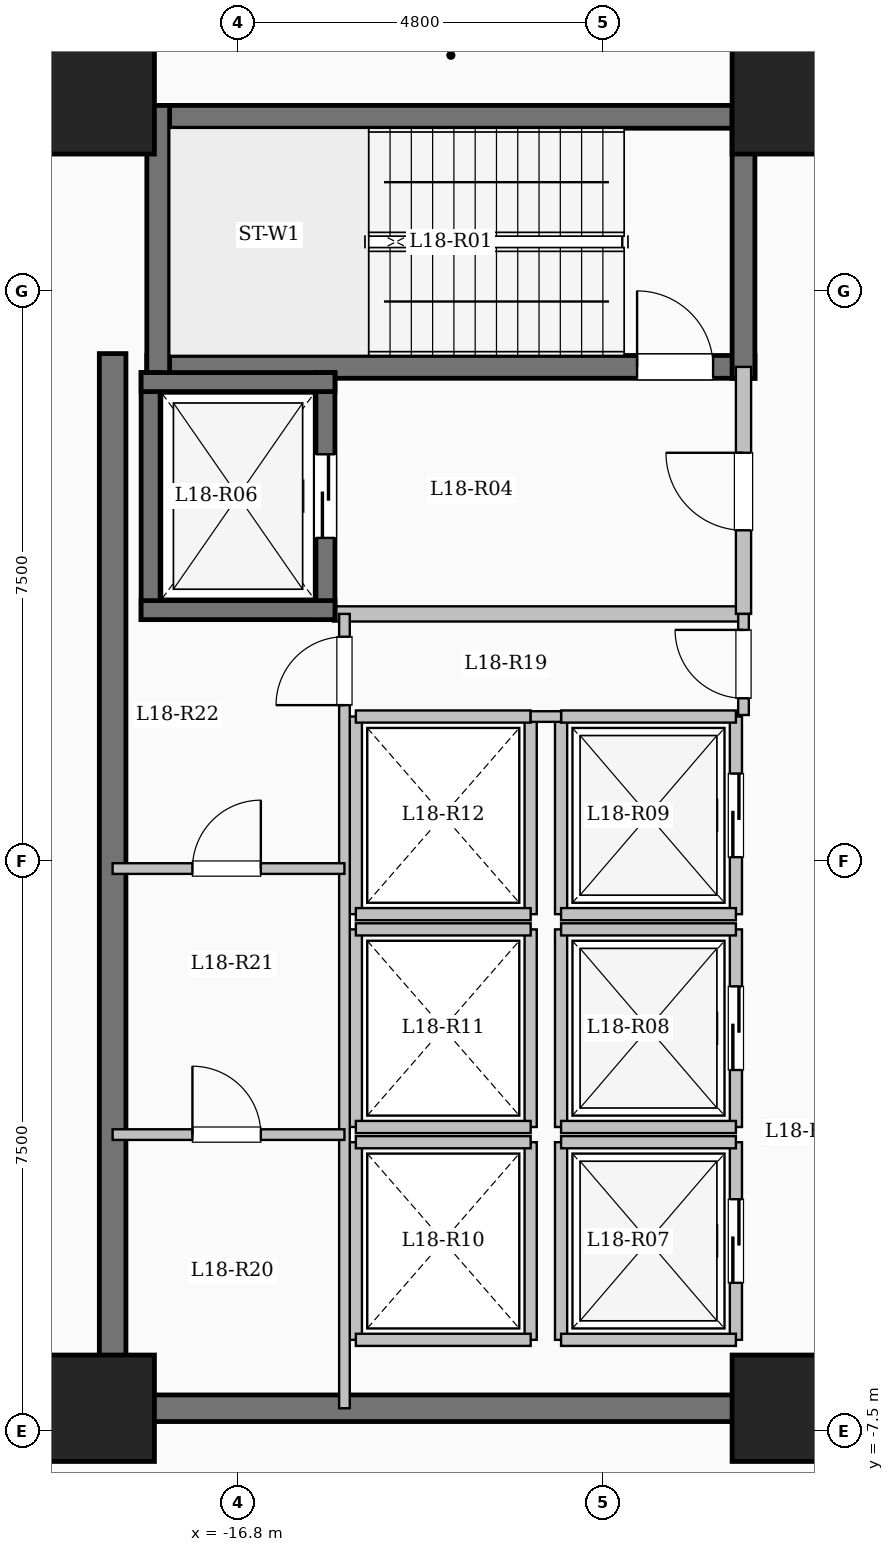
"""IFC4 building model, lengths in metres.
Left out: names, types, materials, properties, quantities, classifications, styles, units other than length and angle.
Written with IfcOpenShell. Run it as: python <this file> out.ifc"""

import sys

from ifc_helpers import new_model, si_unit, direction, frame, frame_2d, origin, origin_2d, place, context, subcontext, project, spatial, rectangle, extrude, element, fill, save


model = new_model("IFC4")
c1 = context("Model", 3, precision=1e-05, world=origin(), true_north=direction((0.0, 1.0)))
c2 = subcontext(c1, "Body", "Model", "MODEL_VIEW")
j1 = project(units=[si_unit("LENGTHUNIT", "METRE"), si_unit("PLANEANGLEUNIT", "RADIAN")], contexts=[c1])
p1 = place(None, origin())
s1 = spatial("IfcSite", under=j1, at=p1, CompositionType="ELEMENT")
p2 = place(p1, origin())
s2 = spatial("IfcBuilding", under=s1, at=p2, CompositionType="ELEMENT")
p3 = place(p2, frame((0.0, 0.0, 68.7)))
s3 = spatial("IfcBuildingStorey", under=s2, at=p3, CompositionType="ELEMENT", Elevation=68.7)
for number, where, z_axis, x_axis in (
    (1, (-9.6, -7.2, 0.0), (0.0, 0.0, 1.0), (1.0, 0.0, 0.0)),
    (2, (-9.6, 10.0, 0.0), (0.0, 0.0, 1.0), (1.0, 0.0, 0.0)),
    (3, (-18.6, -7.2, 0.0), (0.0, 0.0, 1.0), (1.0, 0.0, 0.0)),
    (4, (-18.6, 10.0, 0.0), (0.0, 0.0, 1.0), (1.0, 0.0, 0.0)),
):
    element("IfcColumn", number, at=place(p3, frame(where, z_axis=z_axis, x_axis=x_axis)), inside=s3, PredefinedType="COLUMN", context=c2, shape_type="SweptSolid", body=[
        extrude(rectangle(XDim=1.4, YDim=1.4, at=origin_2d()), origin(), (0.0, 0.0, 1.0), 4.5),
    ])
p4 = place(p3, frame((-18.0, 9.79, 0.0), z_axis=(0.0, 0.0, 1.0), x_axis=(1.0, 0.0, 0.0)))
e5 = element("IfcWall", 5, at=p4, inside=s3, PredefinedType="SHEAR", context=c2, shape_type="SweptSolid", body=[
    extrude(rectangle(XDim=8.0, YDim=0.3, at=frame_2d((4.0, 0.0))), origin(), (0.0, 0.0, 1.0), 4.5),
])
p5 = place(p3, frame((-18.0, 6.5, 0.0), z_axis=(0.0, 0.0, 1.0), x_axis=(1.0, 0.0, 0.0)))
e6 = element("IfcWall", 6, at=p5, inside=s3, PredefinedType="SHEAR", context=c2, shape_type="SweptSolid", body=[
    extrude(rectangle(XDim=8.0, YDim=0.3, at=frame_2d((4.0, 0.0))), origin(), (0.0, 0.0, 1.0), 4.5),
])
p6 = place(p5, frame((6.45, 0.0, 0.0)))
e7 = element("IfcOpeningElement", 7, at=p6, cuts=e6, PredefinedType="OPENING", context=c2, shape_type="SweptSolid", body=[
    extrude(rectangle(XDim=1.0, YDim=2.15, at=frame_2d((0.5, 1.075))), frame((0.0, 0.16, 0.0), z_axis=(0.0, -1.0, 0.0), x_axis=(1.0, 0.0, 0.0)), (0.0, 0.0, 1.0), 0.32),
])
for number, where, z_axis, x_axis in (
    (8, (-17.85, 6.35, 0.0), (0.0, 0.0, 1.0), (0.0, 1.0, 0.0)),
    (9, (-10.15, 6.35, 0.0), (0.0, 0.0, 1.0), (0.0, 1.0, 0.0)),
):
    element("IfcWall", number, at=place(p3, frame(where, z_axis=z_axis, x_axis=x_axis)), inside=s3, PredefinedType="SHEAR", context=c2, shape_type="SweptSolid", body=[
        extrude(rectangle(XDim=3.59, YDim=0.3, at=frame_2d((1.795, 0.0))), origin(), (0.0, 0.0, 1.0), 4.5),
    ])
p7 = place(p3, frame((-15.55, 3.25, 0.0), z_axis=(0.0, 0.0, 1.0), x_axis=(1.0, 0.0, 0.0)))
e10 = element("IfcWall", 10, at=p7, inside=s3, PredefinedType="SOLIDWALL", context=c2, shape_type="SweptSolid", body=[
    extrude(rectangle(XDim=5.4, YDim=0.2, at=frame_2d((2.7, 0.0))), origin(), (0.0, 0.0, 1.0), 4.2),
])
p8 = place(p3, frame((-10.15, 3.25, 0.0), z_axis=(0.0, 0.0, 1.0), x_axis=(0.0, 1.0, 0.0)))
e11 = element("IfcWall", 11, at=p8, inside=s3, PredefinedType="SOLIDWALL", context=c2, shape_type="SweptSolid", body=[
    extrude(rectangle(XDim=3.25, YDim=0.2, at=frame_2d((1.625, 0.0))), origin(), (0.0, 0.0, 1.0), 4.2),
])
p9 = place(p8, frame((1.1, 0.0, 0.0)))
e12 = element("IfcOpeningElement", 12, at=p9, cuts=e11, PredefinedType="OPENING", context=c2, shape_type="SweptSolid", body=[
    extrude(rectangle(XDim=1.02, YDim=2.15, at=frame_2d((0.51, 1.075))), frame((0.0, 0.11, 0.0), z_axis=(0.0, -1.0, 0.0), x_axis=(1.0, 0.0, 0.0)), (0.0, 0.0, 1.0), 0.22),
])
p10 = place(p3, frame((-17.95, 3.175, 0.0), z_axis=(0.0, 0.0, 1.0), x_axis=(0.0, 1.0, 0.0)))
e13 = element("IfcWall", 13, at=p10, inside=s3, PredefinedType="SHEAR", context=c2, shape_type="SweptSolid", body=[
    extrude(rectangle(XDim=3.25, YDim=0.25, at=frame_2d((1.625, 0.0))), origin(), (0.0, 0.0, 1.0), 4.5),
])
p11 = place(p3, frame((-15.65, 3.175, 0.0), z_axis=(0.0, 0.0, 1.0), x_axis=(0.0, 1.0, 0.0)))
e14 = element("IfcWall", 14, at=p11, inside=s3, PredefinedType="SHEAR", context=c2, shape_type="SweptSolid", body=[
    extrude(rectangle(XDim=3.25, YDim=0.25, at=frame_2d((1.625, 0.0))), origin(), (0.0, 0.0, 1.0), 4.5),
])
p12 = place(p11, frame((1.075, 0.0, 0.0)))
e15 = element("IfcOpeningElement", 15, at=p12, cuts=e14, PredefinedType="OPENING", context=c2, shape_type="SweptSolid", body=[
    extrude(rectangle(XDim=1.1, YDim=2.15, at=frame_2d((0.55, 1.075))), frame((0.0, 0.135, 0.0), z_axis=(0.0, -1.0, 0.0), x_axis=(1.0, 0.0, 0.0)), (0.0, 0.0, 1.0), 0.27),
])
for number, where, z_axis, x_axis in (
    (16, (-18.075, 3.3, 0.0), (0.0, 0.0, 1.0), (1.0, 0.0, 0.0)),
    (17, (-18.075, 6.3, 0.0), (0.0, 0.0, 1.0), (1.0, 0.0, 0.0)),
):
    element("IfcWall", number, at=place(p3, frame(where, z_axis=z_axis, x_axis=x_axis)), inside=s3, PredefinedType="SHEAR", context=c2, shape_type="SweptSolid", body=[
        extrude(rectangle(XDim=2.55, YDim=0.25, at=frame_2d((1.275, 0.0))), origin(), (0.0, 0.0, 1.0), 4.5),
    ])
p13 = place(p3, frame((-12.55, -6.3, 0.0), z_axis=(0.0, 0.0, 1.0), x_axis=(0.0, 1.0, 0.0)))
e18 = element("IfcWall", 18, at=p13, inside=s3, PredefinedType="SOLIDWALL", context=c2, shape_type="SweptSolid", body=[
    extrude(rectangle(XDim=2.6, YDim=0.16, at=frame_2d((1.3, 0.0))), origin(), (0.0, 0.0, 1.0), 4.2),
])
p14 = place(p3, frame((-10.25, -6.3, 0.0), z_axis=(0.0, 0.0, 1.0), x_axis=(0.0, 1.0, 0.0)))
e19 = element("IfcWall", 19, at=p14, inside=s3, PredefinedType="SOLIDWALL", context=c2, shape_type="SweptSolid", body=[
    extrude(rectangle(XDim=2.6, YDim=0.16, at=frame_2d((1.3, 0.0))), origin(), (0.0, 0.0, 1.0), 4.2),
])
p15 = place(p14, frame((0.75, 0.0, 0.0)))
e20 = element("IfcOpeningElement", 20, at=p15, cuts=e19, PredefinedType="OPENING", context=c2, shape_type="SweptSolid", body=[
    extrude(rectangle(XDim=1.1, YDim=2.15, at=frame_2d((0.55, 1.075))), frame((0.0, 0.09, 0.0), z_axis=(0.0, -1.0, 0.0), x_axis=(1.0, 0.0, 0.0)), (0.0, 0.0, 1.0), 0.18),
])
for number, where, z_axis, x_axis in (
    (21, (-12.55, -6.3, 0.0), (0.0, 0.0, 1.0), (1.0, 0.0, 0.0)),
    (22, (-12.55, -3.7, 0.0), (0.0, 0.0, 1.0), (1.0, 0.0, 0.0)),
):
    element("IfcWall", number, at=place(p3, frame(where, z_axis=z_axis, x_axis=x_axis)), inside=s3, PredefinedType="SOLIDWALL", context=c2, shape_type="SweptSolid", body=[
        extrude(rectangle(XDim=2.3, YDim=0.16, at=frame_2d((1.15, 0.0))), origin(), (0.0, 0.0, 1.0), 4.2),
    ])
p16 = place(p3, frame((-12.55, -3.5, 0.0), z_axis=(0.0, 0.0, 1.0), x_axis=(0.0, 1.0, 0.0)))
e23 = element("IfcWall", 23, at=p16, inside=s3, PredefinedType="SOLIDWALL", context=c2, shape_type="SweptSolid", body=[
    extrude(rectangle(XDim=2.6, YDim=0.16, at=frame_2d((1.3, 0.0))), origin(), (0.0, 0.0, 1.0), 4.2),
])
p17 = place(p3, frame((-10.25, -3.5, 0.0), z_axis=(0.0, 0.0, 1.0), x_axis=(0.0, 1.0, 0.0)))
e24 = element("IfcWall", 24, at=p17, inside=s3, PredefinedType="SOLIDWALL", context=c2, shape_type="SweptSolid", body=[
    extrude(rectangle(XDim=2.6, YDim=0.16, at=frame_2d((1.3, 0.0))), origin(), (0.0, 0.0, 1.0), 4.2),
])
p18 = place(p17, frame((0.75, 0.0, 0.0)))
e25 = element("IfcOpeningElement", 25, at=p18, cuts=e24, PredefinedType="OPENING", context=c2, shape_type="SweptSolid", body=[
    extrude(rectangle(XDim=1.1, YDim=2.15, at=frame_2d((0.55, 1.075))), frame((0.0, 0.09, 0.0), z_axis=(0.0, -1.0, 0.0), x_axis=(1.0, 0.0, 0.0)), (0.0, 0.0, 1.0), 0.18),
])
for number, where, z_axis, x_axis in (
    (26, (-12.55, -3.5, 0.0), (0.0, 0.0, 1.0), (1.0, 0.0, 0.0)),
    (27, (-12.55, -0.9, 0.0), (0.0, 0.0, 1.0), (1.0, 0.0, 0.0)),
):
    element("IfcWall", number, at=place(p3, frame(where, z_axis=z_axis, x_axis=x_axis)), inside=s3, PredefinedType="SOLIDWALL", context=c2, shape_type="SweptSolid", body=[
        extrude(rectangle(XDim=2.3, YDim=0.16, at=frame_2d((1.15, 0.0))), origin(), (0.0, 0.0, 1.0), 4.2),
    ])
p19 = place(p3, frame((-12.55, -0.7, 0.0), z_axis=(0.0, 0.0, 1.0), x_axis=(0.0, 1.0, 0.0)))
e28 = element("IfcWall", 28, at=p19, inside=s3, PredefinedType="SOLIDWALL", context=c2, shape_type="SweptSolid", body=[
    extrude(rectangle(XDim=2.6, YDim=0.16, at=frame_2d((1.3, 0.0))), origin(), (0.0, 0.0, 1.0), 4.2),
])
p20 = place(p3, frame((-10.25, -0.7, 0.0), z_axis=(0.0, 0.0, 1.0), x_axis=(0.0, 1.0, 0.0)))
e29 = element("IfcWall", 29, at=p20, inside=s3, PredefinedType="SOLIDWALL", context=c2, shape_type="SweptSolid", body=[
    extrude(rectangle(XDim=2.6, YDim=0.16, at=frame_2d((1.3, 0.0))), origin(), (0.0, 0.0, 1.0), 4.2),
])
p21 = place(p20, frame((0.75, 0.0, 0.0)))
e30 = element("IfcOpeningElement", 30, at=p21, cuts=e29, PredefinedType="OPENING", context=c2, shape_type="SweptSolid", body=[
    extrude(rectangle(XDim=1.1, YDim=2.15, at=frame_2d((0.55, 1.075))), frame((0.0, 0.09, 0.0), z_axis=(0.0, -1.0, 0.0), x_axis=(1.0, 0.0, 0.0)), (0.0, 0.0, 1.0), 0.18),
])
for number, where, z_axis, x_axis in (
    (31, (-12.55, -0.7, 0.0), (0.0, 0.0, 1.0), (1.0, 0.0, 0.0)),
    (32, (-12.55, 1.9, 0.0), (0.0, 0.0, 1.0), (1.0, 0.0, 0.0)),
):
    element("IfcWall", number, at=place(p3, frame(where, z_axis=z_axis, x_axis=x_axis)), inside=s3, PredefinedType="SOLIDWALL", context=c2, shape_type="SweptSolid", body=[
        extrude(rectangle(XDim=2.3, YDim=0.16, at=frame_2d((1.15, 0.0))), origin(), (0.0, 0.0, 1.0), 4.2),
    ])
for number, where, z_axis, x_axis in (
    (33, (-15.25, -6.3, 0.0), (0.0, 0.0, 1.0), (0.0, 1.0, 0.0)),
    (34, (-12.95, -6.3, 0.0), (0.0, 0.0, 1.0), (0.0, 1.0, 0.0)),
):
    element("IfcWall", number, at=place(p3, frame(where, z_axis=z_axis, x_axis=x_axis)), inside=s3, PredefinedType="SOLIDWALL", context=c2, shape_type="SweptSolid", body=[
        extrude(rectangle(XDim=2.6, YDim=0.16, at=frame_2d((1.3, 0.0))), origin(), (0.0, 0.0, 1.0), 4.2),
    ])
for number, where, z_axis, x_axis in (
    (35, (-15.25, -6.3, 0.0), (0.0, 0.0, 1.0), (1.0, 0.0, 0.0)),
    (36, (-15.25, -3.7, 0.0), (0.0, 0.0, 1.0), (1.0, 0.0, 0.0)),
):
    element("IfcWall", number, at=place(p3, frame(where, z_axis=z_axis, x_axis=x_axis)), inside=s3, PredefinedType="SOLIDWALL", context=c2, shape_type="SweptSolid", body=[
        extrude(rectangle(XDim=2.3, YDim=0.16, at=frame_2d((1.15, 0.0))), origin(), (0.0, 0.0, 1.0), 4.2),
    ])
for number, where, z_axis, x_axis in (
    (37, (-15.25, -3.5, 0.0), (0.0, 0.0, 1.0), (0.0, 1.0, 0.0)),
    (38, (-12.95, -3.5, 0.0), (0.0, 0.0, 1.0), (0.0, 1.0, 0.0)),
):
    element("IfcWall", number, at=place(p3, frame(where, z_axis=z_axis, x_axis=x_axis)), inside=s3, PredefinedType="SOLIDWALL", context=c2, shape_type="SweptSolid", body=[
        extrude(rectangle(XDim=2.6, YDim=0.16, at=frame_2d((1.3, 0.0))), origin(), (0.0, 0.0, 1.0), 4.2),
    ])
for number, where, z_axis, x_axis in (
    (39, (-15.25, -3.5, 0.0), (0.0, 0.0, 1.0), (1.0, 0.0, 0.0)),
    (40, (-15.25, -0.9, 0.0), (0.0, 0.0, 1.0), (1.0, 0.0, 0.0)),
):
    element("IfcWall", number, at=place(p3, frame(where, z_axis=z_axis, x_axis=x_axis)), inside=s3, PredefinedType="SOLIDWALL", context=c2, shape_type="SweptSolid", body=[
        extrude(rectangle(XDim=2.3, YDim=0.16, at=frame_2d((1.15, 0.0))), origin(), (0.0, 0.0, 1.0), 4.2),
    ])
for number, where, z_axis, x_axis in (
    (41, (-15.25, -0.7, 0.0), (0.0, 0.0, 1.0), (0.0, 1.0, 0.0)),
    (42, (-12.95, -0.7, 0.0), (0.0, 0.0, 1.0), (0.0, 1.0, 0.0)),
):
    element("IfcWall", number, at=place(p3, frame(where, z_axis=z_axis, x_axis=x_axis)), inside=s3, PredefinedType="SOLIDWALL", context=c2, shape_type="SweptSolid", body=[
        extrude(rectangle(XDim=2.6, YDim=0.16, at=frame_2d((1.3, 0.0))), origin(), (0.0, 0.0, 1.0), 4.2),
    ])
for number, where, z_axis, x_axis in (
    (43, (-15.25, -0.7, 0.0), (0.0, 0.0, 1.0), (1.0, 0.0, 0.0)),
    (44, (-15.25, 1.9, 0.0), (0.0, 0.0, 1.0), (1.0, 0.0, 0.0)),
):
    element("IfcWall", number, at=place(p3, frame(where, z_axis=z_axis, x_axis=x_axis)), inside=s3, PredefinedType="SOLIDWALL", context=c2, shape_type="SweptSolid", body=[
        extrude(rectangle(XDim=2.3, YDim=0.16, at=frame_2d((1.15, 0.0))), origin(), (0.0, 0.0, 1.0), 4.2),
    ])
p22 = place(p3, frame((-18.45, -7.375, 0.0), z_axis=(0.0, 0.0, 1.0), x_axis=(0.0, 1.0, 0.0)))
e45 = element("IfcWall", 45, at=p22, inside=s3, PredefinedType="SHEAR", context=c2, shape_type="SweptSolid", body=[
    extrude(rectangle(XDim=14.05, YDim=0.35, at=frame_2d((7.025, 0.0))), origin(), (0.0, 0.0, 1.0), 4.5),
])
p23 = place(p3, frame((-18.625, -7.2, 0.0), z_axis=(0.0, 0.0, 1.0), x_axis=(1.0, 0.0, 0.0)))
e46 = element("IfcWall", 46, at=p23, inside=s3, PredefinedType="SHEAR", context=c2, shape_type="SweptSolid", body=[
    extrude(rectangle(XDim=8.55, YDim=0.35, at=frame_2d((4.275, 0.0))), origin(), (0.0, 0.0, 1.0), 4.5),
])
p24 = place(p3, frame((-12.95, 1.9, 0.0), z_axis=(0.0, 0.0, 1.0), x_axis=(1.0, 0.0, 0.0)))
e47 = element("IfcWall", 47, at=p24, inside=s3, PredefinedType="PARTITIONING", context=c2, shape_type="SweptSolid", body=[
    extrude(rectangle(XDim=0.4, YDim=0.14, at=frame_2d((0.2, 0.0))), origin(), (0.0, 0.0, 1.0), 4.2),
])
p25 = place(p3, frame((-10.15, 1.92, 0.0), z_axis=(0.0, 0.0, 1.0), x_axis=(0.0, 1.0, 0.0)))
e48 = element("IfcWall", 48, at=p25, inside=s3, PredefinedType="PARTITIONING", context=c2, shape_type="SweptSolid", body=[
    extrude(rectangle(XDim=1.33, YDim=0.14, at=frame_2d((0.665, 0.0))), origin(), (0.0, 0.0, 1.0), 4.2),
])
p26 = place(p25, frame((0.22, 0.0, 0.0)))
e49 = element("IfcOpeningElement", 49, at=p26, cuts=e48, PredefinedType="OPENING", context=c2, shape_type="SweptSolid", body=[
    extrude(rectangle(XDim=0.9, YDim=2.08, at=frame_2d((0.45, 1.04))), frame((0.0, 0.08, 0.0), z_axis=(0.0, -1.0, 0.0), x_axis=(1.0, 0.0, 0.0)), (0.0, 0.0, 1.0), 0.16),
])
p27 = place(p3, frame((-15.4, -7.2, 0.0), z_axis=(0.0, 0.0, 1.0), x_axis=(0.0, 1.0, 0.0)))
e50 = element("IfcWall", 50, at=p27, inside=s3, PredefinedType="PARTITIONING", context=c2, shape_type="SweptSolid", body=[
    extrude(rectangle(XDim=10.45, YDim=0.14, at=frame_2d((5.225, 0.0))), origin(), (0.0, 0.0, 1.0), 4.2),
])
p28 = place(p27, frame((9.25, 0.0, 0.0)))
e51 = element("IfcOpeningElement", 51, at=p28, cuts=e50, PredefinedType="OPENING", context=c2, shape_type="SweptSolid", body=[
    extrude(rectangle(XDim=0.9, YDim=2.08, at=frame_2d((0.45, 1.04))), frame((0.0, 0.08, 0.0), z_axis=(0.0, -1.0, 0.0), x_axis=(1.0, 0.0, 0.0)), (0.0, 0.0, 1.0), 0.16),
])
p29 = place(p3, frame((-18.45, -3.6, 0.0), z_axis=(0.0, 0.0, 1.0), x_axis=(1.0, 0.0, 0.0)))
e52 = element("IfcWall", 52, at=p29, inside=s3, PredefinedType="PARTITIONING", context=c2, shape_type="SweptSolid", body=[
    extrude(rectangle(XDim=3.05, YDim=0.14, at=frame_2d((1.525, 0.0))), origin(), (0.0, 0.0, 1.0), 4.2),
])
p30 = place(p29, frame((1.05, 0.0, 0.0)))
e53 = element("IfcOpeningElement", 53, at=p30, cuts=e52, PredefinedType="OPENING", context=c2, shape_type="SweptSolid", body=[
    extrude(rectangle(XDim=0.9, YDim=2.08, at=frame_2d((0.45, 1.04))), frame((0.0, 0.08, 0.0), z_axis=(0.0, -1.0, 0.0), x_axis=(1.0, 0.0, 0.0)), (0.0, 0.0, 1.0), 0.16),
])
p31 = place(p3, frame((-18.45, -0.1, 0.0), z_axis=(0.0, 0.0, 1.0), x_axis=(1.0, 0.0, 0.0)))
e54 = element("IfcWall", 54, at=p31, inside=s3, PredefinedType="PARTITIONING", context=c2, shape_type="SweptSolid", body=[
    extrude(rectangle(XDim=3.05, YDim=0.14, at=frame_2d((1.525, 0.0))), origin(), (0.0, 0.0, 1.0), 4.2),
])
p32 = place(p31, frame((1.05, 0.0, 0.0)))
e55 = element("IfcOpeningElement", 55, at=p32, cuts=e54, PredefinedType="OPENING", context=c2, shape_type="SweptSolid", body=[
    extrude(rectangle(XDim=0.9, YDim=2.08, at=frame_2d((0.45, 1.04))), frame((0.0, 0.08, 0.0), z_axis=(0.0, -1.0, 0.0), x_axis=(1.0, 0.0, 0.0)), (0.0, 0.0, 1.0), 0.16),
])
p33 = place(p3, frame((-28.68, -7.25, 0.0), z_axis=(0.0, 0.0, 1.0), x_axis=(1.0, 0.0, 0.0)))
e56 = element("IfcWall", 56, at=p33, inside=s3, PredefinedType="PARTITIONING", context=c2, shape_type="SweptSolid", body=[
    extrude(rectangle(XDim=10.23, YDim=0.15, at=frame_2d((5.115, 0.0))), origin(), (0.0, 0.0, 1.0), 4.2),
])
p34 = place(p33, frame((7.03, 0.0, 0.0)))
e57 = element("IfcOpeningElement", 57, at=p34, cuts=e56, PredefinedType="OPENING", context=c2, shape_type="SweptSolid", body=[
    extrude(rectangle(XDim=1.08, YDim=2.15, at=frame_2d((0.54, 1.075))), frame((0.0, 0.085, 0.0), z_axis=(0.0, -1.0, 0.0), x_axis=(1.0, 0.0, 0.0)), (0.0, 0.0, 1.0), 0.17),
])
p35 = place(p6, origin())
e58 = element("IfcDoor", 58, at=p35, inside=s3, OperationType="SINGLE_SWING_LEFT", PredefinedType="DOOR", context=c2, shape_type="SweptSolid", body=[
    extrude(rectangle(XDim=1.0, YDim=2.15, at=frame_2d((0.5, 1.075))), frame((0.0, 0.025, 0.0), z_axis=(0.0, -1.0, 0.0), x_axis=(1.0, 0.0, 0.0)), (0.0, 0.0, 1.0), 0.05),
])
fill(e7, e58)
p36 = place(p9, origin())
e59 = element("IfcDoor", 59, at=p36, inside=s3, OperationType="SINGLE_SWING_RIGHT", PredefinedType="DOOR", context=c2, shape_type="SweptSolid", body=[
    extrude(rectangle(XDim=1.02, YDim=2.15, at=frame_2d((0.51, 1.075))), frame((0.0, 0.025, 0.0), z_axis=(0.0, -1.0, 0.0), x_axis=(1.0, 0.0, 0.0)), (0.0, 0.0, 1.0), 0.05),
])
fill(e12, e59)
p37 = place(p12, origin())
e60 = element("IfcDoor", 60, at=p37, inside=s3, OperationType="SLIDING_TO_LEFT", PredefinedType="DOOR", context=c2, shape_type="SweptSolid", body=[
    extrude(rectangle(XDim=1.1, YDim=2.15, at=frame_2d((0.55, 1.075))), frame((0.0, 0.025, 0.0), z_axis=(0.0, -1.0, 0.0), x_axis=(1.0, 0.0, 0.0)), (0.0, 0.0, 1.0), 0.05),
])
fill(e15, e60)
p38 = place(p15, origin())
e61 = element("IfcDoor", 61, at=p38, inside=s3, OperationType="SLIDING_TO_LEFT", PredefinedType="DOOR", context=c2, shape_type="SweptSolid", body=[
    extrude(rectangle(XDim=1.1, YDim=2.15, at=frame_2d((0.55, 1.075))), frame((0.0, 0.025, 0.0), z_axis=(0.0, -1.0, 0.0), x_axis=(1.0, 0.0, 0.0)), (0.0, 0.0, 1.0), 0.05),
])
fill(e20, e61)
p39 = place(p18, origin())
e62 = element("IfcDoor", 62, at=p39, inside=s3, OperationType="SLIDING_TO_LEFT", PredefinedType="DOOR", context=c2, shape_type="SweptSolid", body=[
    extrude(rectangle(XDim=1.1, YDim=2.15, at=frame_2d((0.55, 1.075))), frame((0.0, 0.025, 0.0), z_axis=(0.0, -1.0, 0.0), x_axis=(1.0, 0.0, 0.0)), (0.0, 0.0, 1.0), 0.05),
])
fill(e25, e62)
p40 = place(p21, origin())
e63 = element("IfcDoor", 63, at=p40, inside=s3, OperationType="SLIDING_TO_LEFT", PredefinedType="DOOR", context=c2, shape_type="SweptSolid", body=[
    extrude(rectangle(XDim=1.1, YDim=2.15, at=frame_2d((0.55, 1.075))), frame((0.0, 0.025, 0.0), z_axis=(0.0, -1.0, 0.0), x_axis=(1.0, 0.0, 0.0)), (0.0, 0.0, 1.0), 0.05),
])
fill(e30, e63)
p41 = place(p26, origin())
e64 = element("IfcDoor", 64, at=p41, inside=s3, OperationType="SINGLE_SWING_RIGHT", PredefinedType="DOOR", context=c2, shape_type="SweptSolid", body=[
    extrude(rectangle(XDim=0.9, YDim=2.08, at=frame_2d((0.45, 1.04))), frame((0.0, 0.025, 0.0), z_axis=(0.0, -1.0, 0.0), x_axis=(1.0, 0.0, 0.0)), (0.0, 0.0, 1.0), 0.05),
])
fill(e49, e64)
p42 = place(p28, origin())
e65 = element("IfcDoor", 65, at=p42, inside=s3, OperationType="SINGLE_SWING_LEFT", PredefinedType="DOOR", context=c2, shape_type="SweptSolid", body=[
    extrude(rectangle(XDim=0.9, YDim=2.08, at=frame_2d((0.45, 1.04))), frame((0.0, 0.025, 0.0), z_axis=(0.0, -1.0, 0.0), x_axis=(1.0, 0.0, 0.0)), (0.0, 0.0, 1.0), 0.05),
])
fill(e51, e65)
p43 = place(p32, origin())
e66 = element("IfcDoor", 66, at=p43, inside=s3, OperationType="SINGLE_SWING_RIGHT", PredefinedType="DOOR", context=c2, shape_type="SweptSolid", body=[
    extrude(rectangle(XDim=0.9, YDim=2.08, at=frame_2d((0.45, 1.04))), frame((0.0, 0.025, 0.0), z_axis=(0.0, -1.0, 0.0), x_axis=(1.0, 0.0, 0.0)), (0.0, 0.0, 1.0), 0.05),
])
fill(e55, e66)
p44 = place(p30, origin())
e67 = element("IfcDoor", 67, at=p44, inside=s3, OperationType="SINGLE_SWING_LEFT", PredefinedType="DOOR", context=c2, shape_type="SweptSolid", body=[
    extrude(rectangle(XDim=0.9, YDim=2.08, at=frame_2d((0.45, 1.04))), frame((0.0, 0.025, 0.0), z_axis=(0.0, -1.0, 0.0), x_axis=(1.0, 0.0, 0.0)), (0.0, 0.0, 1.0), 0.05),
])
fill(e53, e67)
save(model, sys.argv[1])
